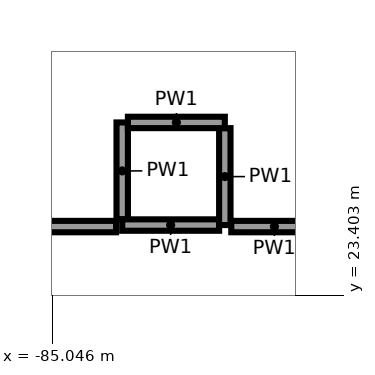
"""IFC4 building model, lengths in metres.
Left out: names, types, materials, properties, quantities, classifications, styles, units other than length and angle.
Written with IfcOpenShell. Run it as: python <this file> out.ifc"""

import sys

from ifc_helpers import new_model, si_unit, direction, frame, frame_2d, origin, place, context, subcontext, project, spatial, rectangle, extrude, element, save


model = new_model("IFC4")
c1 = context("Model", 3, precision=1e-05, world=origin(), true_north=direction((0.0, 1.0)))
c2 = subcontext(c1, "Body", "Model", "MODEL_VIEW")
j1 = project(units=[si_unit("LENGTHUNIT", "METRE"), si_unit("PLANEANGLEUNIT", "RADIAN")], contexts=[c1])
p1 = place(None, origin())
s1 = spatial("IfcSite", under=j1, at=p1, CompositionType="ELEMENT")
p2 = place(p1, origin())
s2 = spatial("IfcBuilding", under=s1, at=p2, CompositionType="ELEMENT")
p3 = place(p2, frame((0.0, 0.0, 6.5)))
s3 = spatial("IfcBuildingStorey", under=s2, at=p3, CompositionType="ELEMENT", Elevation=6.5)
p4 = place(p3, frame((-84.125, 25.675, 0.0), z_axis=(0.0, 0.0, 1.0), x_axis=(0.0, -1.0, 0.0)))
e1 = element("IfcWall", 1, at=p4, inside=s3, PredefinedType="PARTITIONING", context=c2, shape_type="SweptSolid", body=[
    extrude(rectangle(XDim=1.275, YDim=0.15, at=frame_2d((0.638, 0.0))), origin(), (0.0, 0.0, 1.0), 5.15),
])
p5 = place(p3, frame((-84.125, 24.325, 0.0), z_axis=(0.0, 0.0, 1.0), x_axis=(1.0, 0.0, 0.0)))
e2 = element("IfcWall", 2, at=p5, inside=s3, PredefinedType="PARTITIONING", context=c2, shape_type="SweptSolid", body=[
    extrude(rectangle(XDim=1.275, YDim=0.15, at=frame_2d((0.637, 0.0))), origin(), (0.0, 0.0, 1.0), 5.15),
])
for number, where, z_axis, x_axis in (
    (3, (-82.775, 24.325, 0.0), (0.0, 0.0, 1.0), (0.0, 1.0, 0.0)),
    (4, (-82.775, 25.675, 0.0), (0.0, 0.0, 1.0), (-1.0, 0.0, 0.0)),
):
    element("IfcWall", number, at=place(p3, frame(where, z_axis=z_axis, x_axis=x_axis)), inside=s3, PredefinedType="PARTITIONING", context=c2, shape_type="SweptSolid", body=[
        extrude(rectangle(XDim=1.275, YDim=0.15, at=frame_2d((0.638, 0.0))), origin(), (0.0, 0.0, 1.0), 5.15),
    ])
p6 = place(p3, frame((-87.909, 24.305, 0.0), z_axis=(0.0, 0.0, 1.0), x_axis=(1.0, 0.0, 0.0)))
e5 = element("IfcWall", 5, at=p6, inside=s3, PredefinedType="PARTITIONING", context=c2, shape_type="SweptSolid", body=[
    extrude(rectangle(XDim=3.704, YDim=0.15, at=frame_2d((1.852, 0.0))), origin(), (0.0, 0.0, 1.0), 4.05),
])
p7 = place(p6, frame((0.65, 0.0, 0.0)))
e6 = element("IfcOpeningElement", 6, at=p7, cuts=e5, PredefinedType="OPENING", context=c2, shape_type="SweptSolid", body=[
    extrude(rectangle(XDim=1.8, YDim=2.1, at=frame_2d((0.9, 1.05))), frame((0.0, 0.085, 0.0), z_axis=(0.0, -1.0, 0.0), x_axis=(1.0, 0.0, 0.0)), (0.0, 0.0, 1.0), 0.17),
])
p8 = place(p3, frame((-82.69, 24.305, 0.0), z_axis=(0.0, 0.0, 1.0), x_axis=(1.0, 0.0, 0.0)))
e7 = element("IfcWall", 7, at=p8, inside=s3, PredefinedType="PARTITIONING", context=c2, shape_type="SweptSolid", body=[
    extrude(rectangle(XDim=1.135, YDim=0.15, at=frame_2d((0.567, 0.0))), origin(), (0.0, 0.0, 1.0), 5.15),
])
save(model, sys.argv[1])
